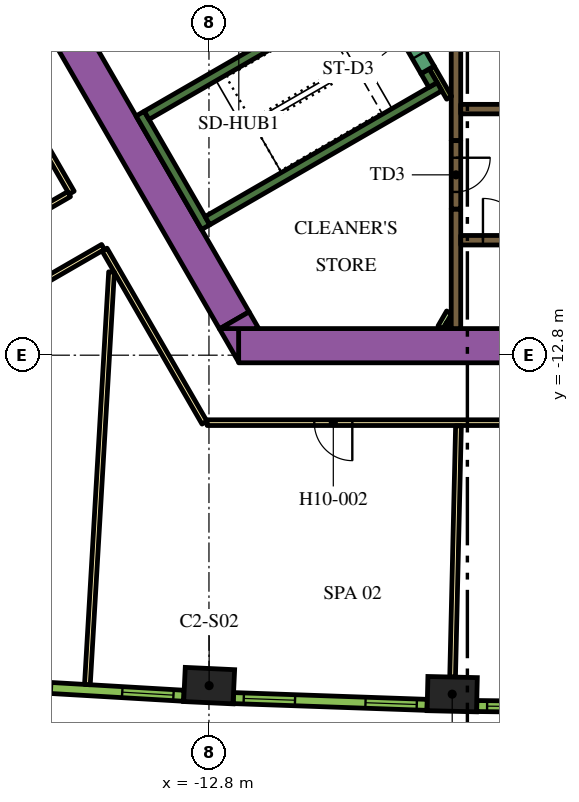
"""IFC4 building model, lengths in metres.
Left out: names, types, materials, properties, quantities, classifications, styles, units other than length and angle.
Written with IfcOpenShell. Run it as: python <this file> out.ifc"""

import sys

from ifc_helpers import new_model, si_unit, direction, frame, frame_2d, origin, origin_2d, place, context, subcontext, project, spatial, polyline, rectangle, outline, extrude, element, fill, save


model = new_model("IFC4")
c1 = context("Model", 3, precision=1e-05, world=origin(), true_north=direction((0.0, 1.0)))
c2 = subcontext(c1, "Body", "Model", "MODEL_VIEW")
j1 = project(units=[si_unit("LENGTHUNIT", "METRE"), si_unit("PLANEANGLEUNIT", "RADIAN")], contexts=[c1])
p1 = place(None, origin())
s1 = spatial("IfcSite", under=j1, at=p1, CompositionType="ELEMENT")
p2 = place(p1, origin())
s2 = spatial("IfcBuilding", under=s1, at=p2, CompositionType="ELEMENT")
p3 = place(p2, frame((0.0, 0.0, 130.5)))
s3 = spatial("IfcBuildingStorey", under=s2, at=p3, CompositionType="ELEMENT", Elevation=130.5)
for number, where, z_axis, x_axis in (
    (1, (-12.795, -21.494, 0.0), (0.0, 0.0, 1.0), (0.999, -0.047, 0.0)),
    (2, (-6.399, -21.719, 0.0), (0.0, 0.0, 1.0), (1.0, -0.023, 0.0)),
):
    element("IfcColumn", number, at=place(p3, frame(where, z_axis=z_axis, x_axis=x_axis)), inside=s3, PredefinedType="COLUMN", context=c2, shape_type="SweptSolid", body=[
        extrude(rectangle(XDim=1.3, YDim=0.9, at=origin_2d()), origin(), (0.0, 0.0, 1.0), 3.9),
    ])
p4 = place(p3, frame((-12.019, -12.55, 0.0), z_axis=(0.0, 0.0, 1.0), x_axis=(1.0, 0.0, 0.0)))
e3 = element("IfcWall", 3, at=p4, inside=s3, PredefinedType="SOLIDWALL", context=c2, shape_type="SweptSolid", body=[
    extrude(rectangle(XDim=21.63, YDim=0.9, at=frame_2d((10.815, 0.0))), origin(), (0.0, 0.0, 1.0), 3.9),
])
p5 = place(p3, origin())
e4 = element("IfcWall", 4, at=p5, inside=s3, PredefinedType="SOLIDWALL", context=c2, shape_type="SweptSolid", body=[
    extrude(outline(polyline([(-12.529, -12.1), (-12.021, -12.1), (-12.021, -12.98), (-12.529, -12.1)])), origin(), (0.0, 0.0, 1.0), 3.9),
])
p6 = place(p3, frame((-12.134, -11.883, 0.0), z_axis=(0.0, 0.0, 1.0), x_axis=(-0.500005339912, 0.866022320763, 0.0)))
e5 = element("IfcWall", 5, at=p6, inside=s3, PredefinedType="SOLIDWALL", context=c2, shape_type="SweptSolid", body=[
    extrude(rectangle(XDim=9.488, YDim=0.9, at=frame_2d((4.744, 0.0))), origin(), (0.0, 0.0, 1.0), 3.9),
])
e6 = element("IfcWall", 6, at=p5, inside=s3, PredefinedType="SOLIDWALL", context=c2, shape_type="SweptSolid", body=[
    extrude(outline(polyline([(-11.489, -12.1), (-12.505, -12.1), (-11.743, -11.66), (-11.489, -12.1)])), origin(), (0.0, 0.0, 1.0), 3.9),
])
p7 = place(p3, frame((-12.885, -9.431, 0.0), z_axis=(0.0, 0.0, 1.0), x_axis=(-0.500020560727, 0.866013532718, 0.0)))
e7 = element("IfcWall", 7, at=p7, inside=s3, PredefinedType="SOLIDWALL", context=c2, shape_type="SweptSolid", body=[
    extrude(rectangle(XDim=3.45, YDim=0.25, at=frame_2d((1.725, 0.0))), origin(), (0.0, 0.0, 1.0), 3.9),
])
p8 = place(p3, frame((-14.44, -6.49, 0.0), z_axis=(0.0, 0.0, 1.0), x_axis=(0.866022966069, 0.500004222222, 0.0)))
e8 = element("IfcWall", 8, at=p8, inside=s3, PredefinedType="SOLIDWALL", context=c2, shape_type="SweptSolid", body=[
    extrude(rectangle(XDim=6.8, YDim=0.25, at=frame_2d((3.4, 0.0))), origin(), (0.0, 0.0, 1.0), 3.9),
])
p9 = place(p3, frame((-12.84, -9.261, 0.0), z_axis=(0.0, 0.0, 1.0), x_axis=(0.866016039709, 0.500016218704, 0.0)))
e9 = element("IfcWall", 9, at=p9, inside=s3, PredefinedType="SOLIDWALL", context=c2, shape_type="SweptSolid", body=[
    extrude(rectangle(XDim=7.05, YDim=0.25, at=frame_2d((3.525, 0.0))), origin(), (0.0, 0.0, 1.0), 3.9),
])
p10 = place(p3, frame((-6.905, -5.69, 0.0), z_axis=(0.0, 0.0, 1.0), x_axis=(-0.499993700073, 0.866029041019, 0.0)))
e10 = element("IfcWall", 10, at=p10, inside=s3, PredefinedType="SOLIDWALL", context=c2, shape_type="SweptSolid", body=[
    extrude(rectangle(XDim=0.416, YDim=0.25, at=frame_2d((0.208, 0.0))), origin(), (0.0, 0.0, 1.0), 3.9),
])
p11 = place(p3, frame((-6.3, -12.1, 0.0), z_axis=(0.0, 0.0, 1.0), x_axis=(0.0, 1.0, 0.0)))
e11 = element("IfcWall", 11, at=p11, inside=s3, PredefinedType="SOLIDWALL", context=c2, shape_type="SweptSolid", body=[
    extrude(rectangle(XDim=3.146, YDim=0.25, at=frame_2d((1.573, 0.0))), origin(), (0.0, 0.0, 1.0), 3.9),
])
p12 = place(p3, frame((-6.3, -4.24, 0.0), z_axis=(0.0, 0.0, 1.0), x_axis=(0.0, -1.0, 0.0)))
e12 = element("IfcWall", 12, at=p12, inside=s3, PredefinedType="SOLIDWALL", context=c2, shape_type="SweptSolid", body=[
    extrude(rectangle(XDim=2.914, YDim=0.25, at=frame_2d((1.457, 0.0))), origin(), (0.0, 0.0, 1.0), 3.9),
])
p13 = place(p3, frame((-6.708, -12.068, 0.0), z_axis=(0.0, 0.0, 1.0), x_axis=(0.500000789788, 0.8660249478, 0.0)))
e13 = element("IfcWall", 13, at=p13, inside=s3, PredefinedType="PARTITIONING", context=c2, shape_type="SweptSolid", body=[
    extrude(rectangle(XDim=0.456, YDim=0.15, at=frame_2d((0.228, 0.0))), origin(), (0.0, 0.0, 1.0), 2.6),
])
p14 = place(p3, frame((-6.534, -12.068, 0.0), z_axis=(0.0, 0.0, 1.0), x_axis=(0.500240224089, 0.865886665912, 0.0)))
e14 = element("IfcWall", 14, at=p14, inside=s3, PredefinedType="PARTITIONING", context=c2, shape_type="SweptSolid", body=[
    extrude(rectangle(XDim=0.109, YDim=0.15, at=frame_2d((0.054, 0.0))), origin(), (0.0, 0.0, 1.0), 2.6),
])
p15 = place(p3, frame((-6.48, -6.027, 0.0), z_axis=(0.0, 0.0, 1.0), x_axis=(-0.499936960004, 0.866061796884, 0.0)))
e15 = element("IfcWall", 15, at=p15, inside=s3, PredefinedType="PARTITIONING", context=c2, shape_type="SweptSolid", body=[
    extrude(rectangle(XDim=0.919, YDim=0.15, at=frame_2d((0.46, 0.0))), origin(), (0.0, 0.0, 1.0), 3.9),
])
p16 = place(p3, frame((-6.175, -9.775, 0.0), z_axis=(0.0, 0.0, 1.0), x_axis=(1.0, 0.0, 0.0)))
e16 = element("IfcWall", 16, at=p16, inside=s3, PredefinedType="SOLIDWALL", context=c2, shape_type="SweptSolid", body=[
    extrude(rectangle(XDim=12.35, YDim=0.25, at=frame_2d((6.175, 0.0))), origin(), (0.0, 0.0, 1.0), 3.9),
])
p17 = place(p16, frame((0.585, 0.0, 0.0)))
e17 = element("IfcOpeningElement", 17, at=p17, cuts=e16, PredefinedType="OPENING", context=c2, shape_type="SweptSolid", body=[
    extrude(rectangle(XDim=1.1, YDim=2.1, at=frame_2d((0.55, 1.05))), frame((0.0, 0.135, 0.0), z_axis=(0.0, -1.0, 0.0), x_axis=(1.0, 0.0, 0.0)), (0.0, 0.0, 1.0), 0.27),
])
p18 = place(p16, frame((3.105, 0.0, 0.0)))
e18 = element("IfcOpeningElement", 18, at=p18, cuts=e16, PredefinedType="OPENING", context=c2, shape_type="SweptSolid", body=[
    extrude(rectangle(XDim=1.1, YDim=2.1, at=frame_2d((0.55, 1.05))), frame((0.0, 0.135, 0.0), z_axis=(0.0, -1.0, 0.0), x_axis=(1.0, 0.0, 0.0)), (0.0, 0.0, 1.0), 0.27),
])
p19 = place(p16, frame((5.625, 0.0, 0.0)))
e19 = element("IfcOpeningElement", 19, at=p19, cuts=e16, PredefinedType="OPENING", context=c2, shape_type="SweptSolid", body=[
    extrude(rectangle(XDim=1.1, YDim=2.1, at=frame_2d((0.55, 1.05))), frame((0.0, 0.135, 0.0), z_axis=(0.0, -1.0, 0.0), x_axis=(1.0, 0.0, 0.0)), (0.0, 0.0, 1.0), 0.27),
])
p20 = place(p16, frame((8.145, 0.0, 0.0)))
e20 = element("IfcOpeningElement", 20, at=p20, cuts=e16, PredefinedType="OPENING", context=c2, shape_type="SweptSolid", body=[
    extrude(rectangle(XDim=1.1, YDim=2.1, at=frame_2d((0.55, 1.05))), frame((0.0, 0.135, 0.0), z_axis=(0.0, -1.0, 0.0), x_axis=(1.0, 0.0, 0.0)), (0.0, 0.0, 1.0), 0.27),
])
p21 = place(p16, frame((10.665, 0.0, 0.0)))
e21 = element("IfcOpeningElement", 21, at=p21, cuts=e16, PredefinedType="OPENING", context=c2, shape_type="SweptSolid", body=[
    extrude(rectangle(XDim=1.1, YDim=2.1, at=frame_2d((0.55, 1.05))), frame((0.0, 0.135, 0.0), z_axis=(0.0, -1.0, 0.0), x_axis=(1.0, 0.0, 0.0)), (0.0, 0.0, 1.0), 0.27),
])
p22 = place(p3, frame((-6.175, -6.325, 0.0), z_axis=(0.0, 0.0, 1.0), x_axis=(1.0, 0.0, 0.0)))
e22 = element("IfcWall", 22, at=p22, inside=s3, PredefinedType="SOLIDWALL", context=c2, shape_type="SweptSolid", body=[
    extrude(rectangle(XDim=12.35, YDim=0.25, at=frame_2d((6.175, 0.0))), origin(), (0.0, 0.0, 1.0), 3.9),
])
p23 = place(p22, frame((3.205, 0.0, 0.0)))
e23 = element("IfcOpeningElement", 23, at=p23, cuts=e22, PredefinedType="OPENING", context=c2, shape_type="SweptSolid", body=[
    extrude(rectangle(XDim=0.9, YDim=2.1, at=frame_2d((0.45, 1.05))), frame((0.0, 0.135, 0.0), z_axis=(0.0, -1.0, 0.0), x_axis=(1.0, 0.0, 0.0)), (0.0, 0.0, 1.0), 0.27),
])
p24 = place(p22, frame((8.145, 0.0, 0.0)))
e24 = element("IfcOpeningElement", 24, at=p24, cuts=e22, PredefinedType="OPENING", context=c2, shape_type="SweptSolid", body=[
    extrude(rectangle(XDim=1.1, YDim=2.1, at=frame_2d((0.55, 1.05))), frame((0.0, 0.135, 0.0), z_axis=(0.0, -1.0, 0.0), x_axis=(1.0, 0.0, 0.0)), (0.0, 0.0, 1.0), 0.27),
])
p25 = place(p22, frame((10.665, 0.0, 0.0)))
e25 = element("IfcOpeningElement", 25, at=p25, cuts=e22, PredefinedType="OPENING", context=c2, shape_type="SweptSolid", body=[
    extrude(rectangle(XDim=1.1, YDim=2.1, at=frame_2d((0.55, 1.05))), frame((0.0, 0.135, 0.0), z_axis=(0.0, -1.0, 0.0), x_axis=(1.0, 0.0, 0.0)), (0.0, 0.0, 1.0), 0.27),
])
p26 = place(p3, frame((-8.098, -3.474, 0.0), z_axis=(0.0, 0.0, 1.0), x_axis=(0.49994051562, -0.866059744384, 0.0)))
e26 = element("IfcWall", 26, at=p26, inside=s3, PredefinedType="SOLIDWALL", context=c2, shape_type="SweptSolid", body=[
    extrude(rectangle(XDim=2.1, YDim=0.4, at=frame_2d((1.05, 0.0))), origin(), (0.0, 0.0, 1.0), 3.9),
])
p27 = place(p26, frame((0.45, 0.0, 0.0)))
e27 = element("IfcOpeningElement", 27, at=p27, cuts=e26, PredefinedType="OPENING", context=c2, shape_type="SweptSolid", body=[
    extrude(rectangle(XDim=1.2, YDim=2.1, at=frame_2d((0.6, 1.05))), frame((0.0, 0.21, 0.0), z_axis=(0.0, -1.0, 0.0), x_axis=(1.0, 0.0, 0.0)), (0.0, 0.0, 1.0), 0.42),
])
p28 = place(p3, frame((-6.3, -7.154, 0.0), z_axis=(0.0, 0.0, 1.0), x_axis=(0.0, -1.0, 0.0)))
e28 = element("IfcWall", 28, at=p28, inside=s3, PredefinedType="SOLIDWALL", context=c2, shape_type="SweptSolid", body=[
    extrude(rectangle(XDim=1.8, YDim=0.25, at=frame_2d((0.9, 0.0))), origin(), (0.0, 0.0, 1.0), 3.9),
])
p29 = place(p28, frame((0.45, 0.0, 0.0)))
e29 = element("IfcOpeningElement", 29, at=p29, cuts=e28, PredefinedType="OPENING", context=c2, shape_type="SweptSolid", body=[
    extrude(rectangle(XDim=0.9, YDim=2.1, at=frame_2d((0.45, 1.05))), frame((0.0, 0.135, 0.0), z_axis=(0.0, -1.0, 0.0), x_axis=(1.0, 0.0, 0.0)), (0.0, 0.0, 1.0), 0.27),
])
p30 = place(p3, frame((-16.412, -8.523, 0.0), z_axis=(0.0, 0.0, 1.0), x_axis=(-0.500001929737, 0.866024289647, 0.0)))
e30 = element("IfcWall", 30, at=p30, inside=s3, PredefinedType="PARTITIONING", context=c2, shape_type="SweptSolid", body=[
    extrude(rectangle(XDim=5.268, YDim=0.15, at=frame_2d((2.634, 0.0))), origin(), (0.0, 0.0, 1.0), 2.6),
])
p31 = place(p30, frame((2.157, 0.0, 0.0)))
e31 = element("IfcOpeningElement", 31, at=p31, cuts=e30, PredefinedType="OPENING", context=c2, shape_type="SweptSolid", body=[
    extrude(rectangle(XDim=1.0, YDim=2.1, at=frame_2d((0.5, 1.05))), frame((0.0, 0.085, 0.0), z_axis=(0.0, -1.0, 0.0), x_axis=(1.0, 0.0, 0.0)), (0.0, 0.0, 1.0), 0.17),
])
p32 = place(p3, frame((-28.211, -15.335, 0.0), z_axis=(0.0, 0.0, 1.0), x_axis=(0.866025884867, 0.49999916674, 0.0)))
e32 = element("IfcWall", 32, at=p32, inside=s3, PredefinedType="PARTITIONING", context=c2, shape_type="SweptSolid", body=[
    extrude(rectangle(XDim=13.543, YDim=0.15, at=frame_2d((6.772, 0.0))), origin(), (0.0, 0.0, 1.0), 2.6),
])
p33 = place(p32, frame((8.488, 0.0, 0.0)))
e33 = element("IfcOpeningElement", 33, at=p33, cuts=e32, PredefinedType="OPENING", context=c2, shape_type="SweptSolid", body=[
    extrude(rectangle(XDim=1.0, YDim=2.1, at=frame_2d((0.5, 1.05))), frame((0.0, 0.085, 0.0), z_axis=(0.0, -1.0, 0.0), x_axis=(1.0, 0.0, 0.0)), (0.0, 0.0, 1.0), 0.17),
])
p34 = place(p3, frame((-15.587, -9.952, 0.0), z_axis=(0.0, 0.0, 1.0), x_axis=(-0.866017869832, -0.500013048961, 0.0)))
e34 = element("IfcWall", 34, at=p34, inside=s3, PredefinedType="PARTITIONING", context=c2, shape_type="SweptSolid", body=[
    extrude(rectangle(XDim=13.624, YDim=0.15, at=frame_2d((6.812, 0.0))), origin(), (0.0, 0.0, 1.0), 2.6),
])
p35 = place(p34, frame((6.334, 0.0, 0.0)))
e35 = element("IfcOpeningElement", 35, at=p35, cuts=e34, PredefinedType="OPENING", context=c2, shape_type="SweptSolid", body=[
    extrude(rectangle(XDim=1.0, YDim=2.1, at=frame_2d((0.5, 1.05))), frame((0.0, 0.085, 0.0), z_axis=(0.0, -1.0, 0.0), x_axis=(1.0, 0.0, 0.0)), (0.0, 0.0, 1.0), 0.17),
])
p36 = place(p3, frame((-12.918, -14.575, 0.0), z_axis=(0.0, 0.0, 1.0), x_axis=(-0.500009150678, 0.866020120573, 0.0)))
e36 = element("IfcWall", 36, at=p36, inside=s3, PredefinedType="PARTITIONING", context=c2, shape_type="SweptSolid", body=[
    extrude(rectangle(XDim=5.258, YDim=0.15, at=frame_2d((2.629, 0.0))), origin(), (0.0, 0.0, 1.0), 2.6),
])
p37 = place(p3, frame((12.918, -14.575, 0.0), z_axis=(0.0, 0.0, 1.0), x_axis=(-1.0, 0.0, 0.0)))
e37 = element("IfcWall", 37, at=p37, inside=s3, PredefinedType="PARTITIONING", context=c2, shape_type="SweptSolid", body=[
    extrude(rectangle(XDim=25.766, YDim=0.15, at=frame_2d((12.883, 0.0))), origin(), (0.0, 0.0, 1.0), 2.6),
])
p38 = place(p37, frame((21.946, 0.0, 0.0)))
e38 = element("IfcOpeningElement", 38, at=p38, cuts=e37, PredefinedType="OPENING", context=c2, shape_type="SweptSolid", body=[
    extrude(rectangle(XDim=1.0, YDim=2.1, at=frame_2d((0.5, 1.05))), frame((0.0, 0.085, 0.0), z_axis=(0.0, -1.0, 0.0), x_axis=(1.0, 0.0, 0.0)), (0.0, 0.0, 1.0), 0.17),
])
p39 = place(p37, frame((13.977, 0.0, 0.0)))
e39 = element("IfcOpeningElement", 39, at=p39, cuts=e37, PredefinedType="OPENING", context=c2, shape_type="SweptSolid", body=[
    extrude(rectangle(XDim=1.0, YDim=2.1, at=frame_2d((0.5, 1.05))), frame((0.0, 0.085, 0.0), z_axis=(0.0, -1.0, 0.0), x_axis=(1.0, 0.0, 0.0)), (0.0, 0.0, 1.0), 0.17),
])
p40 = place(p37, frame((4.622, 0.0, 0.0)))
e40 = element("IfcOpeningElement", 40, at=p40, cuts=e37, PredefinedType="OPENING", context=c2, shape_type="SweptSolid", body=[
    extrude(rectangle(XDim=1.0, YDim=2.1, at=frame_2d((0.5, 1.05))), frame((0.0, 0.085, 0.0), z_axis=(0.0, -1.0, 0.0), x_axis=(1.0, 0.0, 0.0)), (0.0, 0.0, 1.0), 0.17),
])
p41 = place(p3, frame((-15.999, -21.467, 0.0), z_axis=(0.0, 0.0, 1.0), x_axis=(0.058411453297, 0.998292593443, 0.0)))
e41 = element("IfcWall", 41, at=p41, inside=s3, PredefinedType="PARTITIONING", context=c2, shape_type="SweptSolid", body=[
    extrude(rectangle(XDim=10.875, YDim=0.15, at=frame_2d((5.438, 0.0))), origin(), (0.0, 0.0, 1.0), 2.6),
])
p42 = place(p3, frame((-6.389, -21.269, 0.0), z_axis=(0.0, 0.0, 1.0), x_axis=(0.023377429176, 0.999726710559, 0.0)))
e42 = element("IfcWall", 42, at=p42, inside=s3, PredefinedType="PARTITIONING", context=c2, shape_type="SweptSolid", body=[
    extrude(rectangle(XDim=6.611, YDim=0.15, at=frame_2d((3.305, 0.0))), origin(), (0.0, 0.0, 1.0), 2.6),
])
p43 = place(p3, frame((-18.553, -21.463, 0.0), z_axis=(0.0, 0.0, 1.0), x_axis=(0.998290511436, -0.058447025388, 0.0)))
e43 = element("IfcWall", 43, at=p43, inside=s3, PredefinedType="SOLIDWALL", context=c2, shape_type="SweptSolid", body=[
    extrude(rectangle(XDim=5.1, YDim=0.29, at=frame_2d((2.55, 0.0))), origin(), (0.0, 0.0, 1.0), 3.5),
])
p44 = place(p43, frame((0.273, 0.0, 0.9)))
e44 = element("IfcOpeningElement", 44, at=p44, cuts=e43, PredefinedType="OPENING", context=c2, shape_type="SweptSolid", body=[
    extrude(rectangle(XDim=1.35, YDim=2.15, at=frame_2d((0.675, 1.075))), frame((0.0, 0.155, 0.0), z_axis=(0.0, -1.0, 0.0), x_axis=(1.0, 0.0, 0.0)), (0.0, 0.0, 1.0), 0.31),
])
p45 = place(p43, frame((3.478, 0.0, 0.9)))
e45 = element("IfcOpeningElement", 45, at=p45, cuts=e43, PredefinedType="OPENING", context=c2, shape_type="SweptSolid", body=[
    extrude(rectangle(XDim=1.35, YDim=2.15, at=frame_2d((0.675, 1.075))), frame((0.0, 0.155, 0.0), z_axis=(0.0, -1.0, 0.0), x_axis=(1.0, 0.0, 0.0)), (0.0, 0.0, 1.0), 0.31),
])
p46 = place(p3, frame((-12.157, -21.822, 0.0), z_axis=(0.0, 0.0, 1.0), x_axis=(0.999385993957, -0.035037623812, 0.0)))
e46 = element("IfcWall", 46, at=p46, inside=s3, PredefinedType="SOLIDWALL", context=c2, shape_type="SweptSolid", body=[
    extrude(rectangle(XDim=5.101, YDim=0.29, at=frame_2d((2.55, 0.0))), origin(), (0.0, 0.0, 1.0), 3.5),
])
p47 = place(p46, frame((0.273, 0.0, 0.9)))
e47 = element("IfcOpeningElement", 47, at=p47, cuts=e46, PredefinedType="OPENING", context=c2, shape_type="SweptSolid", body=[
    extrude(rectangle(XDim=1.35, YDim=2.15, at=frame_2d((0.675, 1.075))), frame((0.0, 0.155, 0.0), z_axis=(0.0, -1.0, 0.0), x_axis=(1.0, 0.0, 0.0)), (0.0, 0.0, 1.0), 0.31),
])
p48 = place(p46, frame((3.478, 0.0, 0.9)))
e48 = element("IfcOpeningElement", 48, at=p48, cuts=e46, PredefinedType="OPENING", context=c2, shape_type="SweptSolid", body=[
    extrude(rectangle(XDim=1.35, YDim=2.15, at=frame_2d((0.675, 1.075))), frame((0.0, 0.155, 0.0), z_axis=(0.0, -1.0, 0.0), x_axis=(1.0, 0.0, 0.0)), (0.0, 0.0, 1.0), 0.31),
])
p49 = place(p3, frame((-5.753, -22.031, 0.0), z_axis=(0.0, 0.0, 1.0), x_axis=(0.999931786565, -0.011679992145, 0.0)))
e49 = element("IfcWall", 49, at=p49, inside=s3, PredefinedType="SOLIDWALL", context=c2, shape_type="SweptSolid", body=[
    extrude(rectangle(XDim=5.1, YDim=0.29, at=frame_2d((2.55, 0.0))), origin(), (0.0, 0.0, 1.0), 3.5),
])
p50 = place(p49, frame((0.272, 0.0, 0.9)))
e50 = element("IfcOpeningElement", 50, at=p50, cuts=e49, PredefinedType="OPENING", context=c2, shape_type="SweptSolid", body=[
    extrude(rectangle(XDim=1.35, YDim=2.15, at=frame_2d((0.675, 1.075))), frame((0.0, 0.155, 0.0), z_axis=(0.0, -1.0, 0.0), x_axis=(1.0, 0.0, 0.0)), (0.0, 0.0, 1.0), 0.31),
])
p51 = place(p49, frame((3.478, 0.0, 0.9)))
e51 = element("IfcOpeningElement", 51, at=p51, cuts=e49, PredefinedType="OPENING", context=c2, shape_type="SweptSolid", body=[
    extrude(rectangle(XDim=1.35, YDim=2.15, at=frame_2d((0.675, 1.075))), frame((0.0, 0.155, 0.0), z_axis=(0.0, -1.0, 0.0), x_axis=(1.0, 0.0, 0.0)), (0.0, 0.0, 1.0), 0.31),
])
p52 = place(p17, origin())
e52 = element("IfcDoor", 52, at=p52, inside=s3, OperationType="DOUBLE_DOOR_SLIDING", PredefinedType="DOOR", context=c2, shape_type="SweptSolid", body=[
    extrude(rectangle(XDim=1.1, YDim=2.1, at=frame_2d((0.55, 1.05))), frame((0.0, 0.025, 0.0), z_axis=(0.0, -1.0, 0.0), x_axis=(1.0, 0.0, 0.0)), (0.0, 0.0, 1.0), 0.05),
])
fill(e17, e52)
p53 = place(p27, origin())
e53 = element("IfcDoor", 53, at=p53, inside=s3, OperationType="SINGLE_SWING_LEFT", PredefinedType="DOOR", context=c2, shape_type="SweptSolid", body=[
    extrude(rectangle(XDim=1.2, YDim=2.1, at=frame_2d((0.6, 1.05))), frame((0.0, 0.025, 0.0), z_axis=(0.0, -1.0, 0.0), x_axis=(1.0, 0.0, 0.0)), (0.0, 0.0, 1.0), 0.05),
])
fill(e27, e53)
p54 = place(p29, origin())
e54 = element("IfcDoor", 54, at=p54, inside=s3, OperationType="SINGLE_SWING_LEFT", PredefinedType="DOOR", context=c2, shape_type="SweptSolid", body=[
    extrude(rectangle(XDim=0.9, YDim=2.1, at=frame_2d((0.45, 1.05))), frame((0.0, 0.025, 0.0), z_axis=(0.0, -1.0, 0.0), x_axis=(1.0, 0.0, 0.0)), (0.0, 0.0, 1.0), 0.05),
])
fill(e29, e54)
p55 = place(p38, origin())
e55 = element("IfcDoor", 55, at=p55, inside=s3, OperationType="SINGLE_SWING_RIGHT", PredefinedType="DOOR", context=c2, shape_type="SweptSolid", body=[
    extrude(rectangle(XDim=1.0, YDim=2.1, at=frame_2d((0.5, 1.05))), frame((0.0, 0.025, 0.0), z_axis=(0.0, -1.0, 0.0), x_axis=(1.0, 0.0, 0.0)), (0.0, 0.0, 1.0), 0.05),
])
fill(e38, e55)
p56 = place(p45, origin())
e56 = element("IfcWindow", 56, at=p56, inside=s3, PartitioningType="DOUBLE_PANEL_VERTICAL", PredefinedType="WINDOW", context=c2, shape_type="SweptSolid", body=[
    extrude(rectangle(XDim=1.35, YDim=2.15, at=frame_2d((0.675, 1.075))), frame((0.0, 0.015, 0.0), z_axis=(0.0, -1.0, 0.0), x_axis=(1.0, 0.0, 0.0)), (0.0, 0.0, 1.0), 0.06),
])
fill(e45, e56)
p57 = place(p47, origin())
e57 = element("IfcWindow", 57, at=p57, inside=s3, PartitioningType="DOUBLE_PANEL_VERTICAL", PredefinedType="WINDOW", context=c2, shape_type="SweptSolid", body=[
    extrude(rectangle(XDim=1.35, YDim=2.15, at=frame_2d((0.675, 1.075))), frame((0.0, 0.015, 0.0), z_axis=(0.0, -1.0, 0.0), x_axis=(1.0, 0.0, 0.0)), (0.0, 0.0, 1.0), 0.06),
])
fill(e47, e57)
p58 = place(p48, origin())
e58 = element("IfcWindow", 58, at=p58, inside=s3, PartitioningType="DOUBLE_PANEL_VERTICAL", PredefinedType="WINDOW", context=c2, shape_type="SweptSolid", body=[
    extrude(rectangle(XDim=1.35, YDim=2.15, at=frame_2d((0.675, 1.075))), frame((0.0, 0.015, 0.0), z_axis=(0.0, -1.0, 0.0), x_axis=(1.0, 0.0, 0.0)), (0.0, 0.0, 1.0), 0.06),
])
fill(e48, e58)
p59 = place(p50, origin())
e59 = element("IfcWindow", 59, at=p59, inside=s3, PartitioningType="DOUBLE_PANEL_VERTICAL", PredefinedType="WINDOW", context=c2, shape_type="SweptSolid", body=[
    extrude(rectangle(XDim=1.35, YDim=2.15, at=frame_2d((0.675, 1.075))), frame((0.0, 0.015, 0.0), z_axis=(0.0, -1.0, 0.0), x_axis=(1.0, 0.0, 0.0)), (0.0, 0.0, 1.0), 0.06),
])
fill(e50, e59)
save(model, sys.argv[1])
